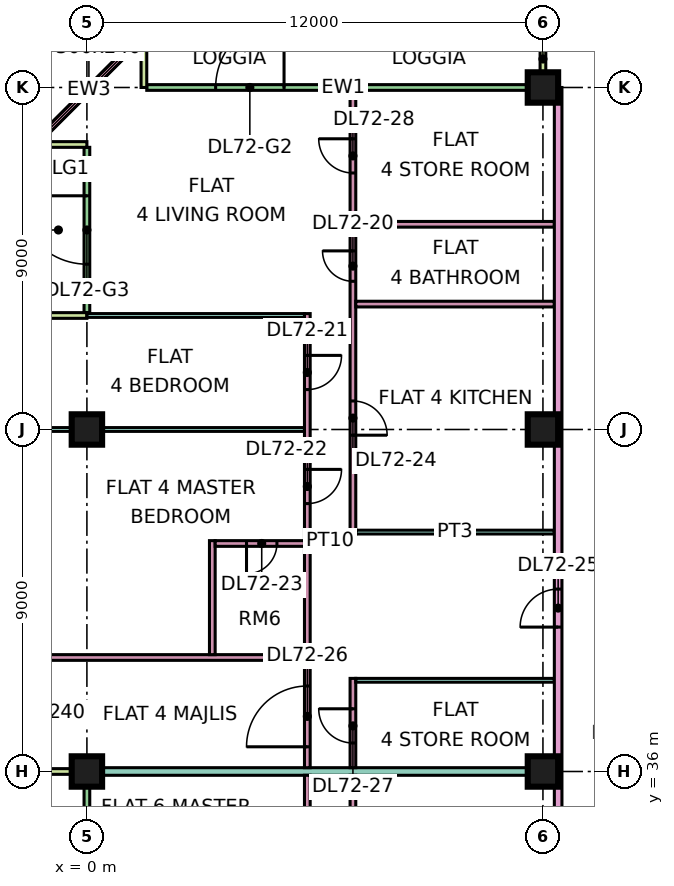
"""IFC4 building model, lengths in metres.
Left out: names, types, materials, properties, quantities, classifications, styles, units other than length and angle.
Written with IfcOpenShell. Run it as: python <this file> out.ifc"""

import sys

from ifc_helpers import new_model, si_unit, direction, frame, frame_2d, origin, origin_2d, place, context, subcontext, project, spatial, rectangle, extrude, element, fill, save


model = new_model("IFC4")
c1 = context("Model", 3, precision=1e-05, world=origin(), true_north=direction((0.0, 1.0)))
c2 = subcontext(c1, "Body", "Model", "MODEL_VIEW")
j1 = project(units=[si_unit("LENGTHUNIT", "METRE"), si_unit("PLANEANGLEUNIT", "RADIAN")], contexts=[c1])
p1 = place(None, origin())
s1 = spatial("IfcSite", under=j1, at=p1, CompositionType="ELEMENT")
p2 = place(p1, origin())
s2 = spatial("IfcBuilding", under=s1, at=p2, CompositionType="ELEMENT")
p3 = place(p2, frame((0.0, 0.0, 307.15)))
s3 = spatial("IfcBuildingStorey", under=s2, at=p3, CompositionType="ELEMENT", Elevation=307.15)
p4 = place(p3, frame((0.0, 36.0, 0.0), z_axis=(0.0, 0.0, 1.0), x_axis=(1.0, 0.0, 0.0)))
e1 = element("IfcColumn", 1, at=p4, inside=s3, PredefinedType="COLUMN", context=c2, shape_type="SweptSolid", body=[
    extrude(rectangle(XDim=0.8, YDim=0.8, at=origin_2d()), origin(), (0.0, 0.0, 1.0), 3.75),
])
for number, where, z_axis, x_axis in (
    (2, (0.0, 45.0, 0.0), (0.0, 0.0, 1.0), (1.0, 0.0, 0.0)),
    (3, (12.0, 36.0, 0.0), (0.0, 0.0, 1.0), (1.0, 0.0, 0.0)),
    (4, (12.0, 45.0, 0.0), (0.0, 0.0, 1.0), (1.0, 0.0, 0.0)),
    (5, (12.0, 54.0, 0.0), (0.0, 0.0, 1.0), (1.0, 0.0, 0.0)),
):
    element("IfcColumn", number, at=place(p3, frame(where, z_axis=z_axis, x_axis=x_axis)), inside=s3, PredefinedType="COLUMN", context=c2, shape_type="SweptSolid", body=[
        extrude(rectangle(XDim=0.8, YDim=0.8, at=origin_2d()), origin(), (0.0, 0.0, 1.0), 3.75),
    ])
p5 = place(p3, frame((11.925, 54.0, 0.0), z_axis=(0.0, 0.0, 1.0), x_axis=(-1.0, 0.0, 0.0)))
e6 = element("IfcWall", 6, at=p5, inside=s3, PredefinedType="SOLIDWALL", context=c2, shape_type="SweptSolid", body=[
    extrude(rectangle(XDim=10.35, YDim=0.15, at=frame_2d((5.175, 0.0))), origin(), (0.0, 0.0, 1.0), 3.35),
])
p6 = place(p5, frame((6.738, 0.0, 0.0)))
e7 = element("IfcOpeningElement", 7, at=p6, cuts=e6, PredefinedType="OPENING", context=c2, shape_type="SweptSolid", body=[
    extrude(rectangle(XDim=1.8, YDim=2.4, at=frame_2d((0.9, 1.2))), frame((0.0, 0.085, 0.0), z_axis=(0.0, -1.0, 0.0), x_axis=(1.0, 0.0, 0.0)), (0.0, 0.0, 1.0), 0.17),
])
for number, where, z_axis, x_axis in (
    (8, (12.0, 55.5, 0.0), (0.0, 0.0, 1.0), (0.0, -1.0, 0.0)),
    (9, (1.5, 55.5, 0.0), (0.0, 0.0, 1.0), (0.0, -1.0, 0.0)),
):
    element("IfcWall", number, at=place(p3, frame(where, z_axis=z_axis, x_axis=x_axis)), inside=s3, PredefinedType="SOLIDWALL", context=c2, shape_type="SweptSolid", body=[
        extrude(rectangle(XDim=1.5, YDim=0.15, at=frame_2d((0.75, 0.0))), origin(), (0.0, 0.0, 1.0), 3.35),
    ])
p7 = place(p3, frame((1.553, 55.447, 0.0), z_axis=(0.0, 0.0, 1.0), x_axis=(-0.707106781187, -0.707106781187, 0.0)))
e10 = element("IfcWall", 10, at=p7, inside=s3, PredefinedType="SOLIDWALL", context=c2, shape_type="SweptSolid", body=[
    extrude(rectangle(XDim=4.243, YDim=0.15, at=frame_2d((2.121, 0.0))), origin(), (0.0, 0.0, 1.0), 3.35),
])
p8 = place(p7, frame((0.621, 0.0, 0.45)))
e11 = element("IfcOpeningElement", 11, at=p8, cuts=e10, PredefinedType="OPENING", context=c2, shape_type="SweptSolid", body=[
    extrude(rectangle(XDim=3.0, YDim=2.4, at=frame_2d((1.5, 1.2))), frame((0.0, 0.085, 0.0), z_axis=(0.0, -1.0, 0.0), x_axis=(1.0, 0.0, 0.0)), (0.0, 0.0, 1.0), 0.17),
])
p9 = place(p3, frame((0.0, 52.425, 0.0), z_axis=(0.0, 0.0, 1.0), x_axis=(0.0, -1.0, 0.0)))
e12 = element("IfcWall", 12, at=p9, inside=s3, PredefinedType="SOLIDWALL", context=c2, shape_type="SweptSolid", body=[
    extrude(rectangle(XDim=4.35, YDim=0.15, at=frame_2d((2.175, 0.0))), origin(), (0.0, 0.0, 1.0), 3.35),
])
p10 = place(p9, frame((1.275, 0.0, 0.0)))
e13 = element("IfcOpeningElement", 13, at=p10, cuts=e12, PredefinedType="OPENING", context=c2, shape_type="SweptSolid", body=[
    extrude(rectangle(XDim=1.8, YDim=2.4, at=frame_2d((0.9, 1.2))), frame((0.0, 0.085, 0.0), z_axis=(0.0, -1.0, 0.0), x_axis=(1.0, 0.0, 0.0)), (0.0, 0.0, 1.0), 0.17),
])
for number, where, z_axis, x_axis in (
    (14, (-1.5, 52.5, 0.0), (0.0, 0.0, 1.0), (1.0, 0.0, 0.0)),
    (15, (-1.5, 48.0, 0.0), (0.0, 0.0, 1.0), (1.0, 0.0, 0.0)),
):
    element("IfcWall", number, at=place(p3, frame(where, z_axis=z_axis, x_axis=x_axis)), inside=s3, PredefinedType="SOLIDWALL", context=c2, shape_type="SweptSolid", body=[
        extrude(rectangle(XDim=1.5, YDim=0.15, at=frame_2d((0.75, 0.0))), origin(), (0.0, 0.0, 1.0), 3.35),
    ])
p11 = place(p3, frame((0.0, 35.925, 0.0), z_axis=(0.0, 0.0, 1.0), x_axis=(0.0, -1.0, 0.0)))
e16 = element("IfcWall", 16, at=p11, inside=s3, PredefinedType="SOLIDWALL", context=c2, shape_type="SweptSolid", body=[
    extrude(rectangle(XDim=11.85, YDim=0.15, at=frame_2d((5.925, 0.0))), origin(), (0.0, 0.0, 1.0), 3.35),
])
p12 = place(p11, frame((2.275, 0.0, 0.0)))
e17 = element("IfcOpeningElement", 17, at=p12, cuts=e16, PredefinedType="OPENING", context=c2, shape_type="SweptSolid", body=[
    extrude(rectangle(XDim=1.8, YDim=2.4, at=frame_2d((0.9, 1.2))), frame((0.0, 0.085, 0.0), z_axis=(0.0, -1.0, 0.0), x_axis=(1.0, 0.0, 0.0)), (0.0, 0.0, 1.0), 0.17),
])
p13 = place(p11, frame((6.525, 0.0, 0.45)))
e18 = element("IfcOpeningElement", 18, at=p13, cuts=e16, PredefinedType="OPENING", context=c2, shape_type="SweptSolid", body=[
    extrude(rectangle(XDim=1.8, YDim=2.4, at=frame_2d((0.9, 1.2))), frame((0.0, 0.085, 0.0), z_axis=(0.0, -1.0, 0.0), x_axis=(1.0, 0.0, 0.0)), (0.0, 0.0, 1.0), 0.17),
])
p14 = place(p11, frame((9.275, 0.0, 0.45)))
e19 = element("IfcOpeningElement", 19, at=p14, cuts=e16, PredefinedType="OPENING", context=c2, shape_type="SweptSolid", body=[
    extrude(rectangle(XDim=1.8, YDim=2.4, at=frame_2d((0.9, 1.2))), frame((0.0, 0.085, 0.0), z_axis=(0.0, -1.0, 0.0), x_axis=(1.0, 0.0, 0.0)), (0.0, 0.0, 1.0), 0.17),
])
p15 = place(p3, frame((-1.5, 36.0, 0.0), z_axis=(0.0, 0.0, 1.0), x_axis=(1.0, 0.0, 0.0)))
e20 = element("IfcWall", 20, at=p15, inside=s3, PredefinedType="SOLIDWALL", context=c2, shape_type="SweptSolid", body=[
    extrude(rectangle(XDim=1.5, YDim=0.15, at=frame_2d((0.75, 0.0))), origin(), (0.0, 0.0, 1.0), 3.35),
])
p16 = place(p3, frame((-1.351, 39.0, 0.0), z_axis=(0.0, 0.0, 1.0), x_axis=(1.0, 0.0, 0.0)))
e21 = element("IfcWall", 21, at=p16, inside=s3, PredefinedType="PARTITIONING", context=c2, shape_type="SweptSolid", body=[
    extrude(rectangle(XDim=7.076, YDim=0.15, at=frame_2d((3.538, 0.0))), origin(), (0.0, 0.0, 1.0), 3.35),
])
p17 = place(p3, frame((-1.351, 45.0, 0.0), z_axis=(0.0, 0.0, 1.0), x_axis=(1.0, 0.0, 0.0)))
e22 = element("IfcWall", 22, at=p17, inside=s3, PredefinedType="PARTITIONING", context=c2, shape_type="SweptSolid", body=[
    extrude(rectangle(XDim=7.076, YDim=0.1, at=frame_2d((3.538, 0.0))), origin(), (0.0, 0.0, 1.0), 3.35),
])
e23 = element("IfcWall", 23, at=p4, inside=s3, PredefinedType="PARTITIONING", context=c2, shape_type="SweptSolid", body=[
    extrude(rectangle(XDim=12.3, YDim=0.2, at=frame_2d((6.15, 0.0))), origin(), (0.0, 0.0, 1.0), 3.35),
])
p18 = place(p3, frame((0.0, 48.0, 0.0), z_axis=(0.0, 0.0, 1.0), x_axis=(1.0, 0.0, 0.0)))
e24 = element("IfcWall", 24, at=p18, inside=s3, PredefinedType="PARTITIONING", context=c2, shape_type="SweptSolid", body=[
    extrude(rectangle(XDim=5.725, YDim=0.1, at=frame_2d((2.863, 0.0))), origin(), (0.0, 0.0, 1.0), 3.35),
])
p19 = place(p3, frame((3.3, 39.075, 0.0), z_axis=(0.0, 0.0, 1.0), x_axis=(0.0, 1.0, 0.0)))
e25 = element("IfcWall", 25, at=p19, inside=s3, PredefinedType="PARTITIONING", context=c2, shape_type="SweptSolid", body=[
    extrude(rectangle(XDim=3.0, YDim=0.15, at=frame_2d((1.5, 0.0))), origin(), (0.0, 0.0, 1.0), 3.35),
])
p20 = place(p3, frame((3.375, 42.0, 0.0), z_axis=(0.0, 0.0, 1.0), x_axis=(1.0, 0.0, 0.0)))
e26 = element("IfcWall", 26, at=p20, inside=s3, PredefinedType="PARTITIONING", context=c2, shape_type="SweptSolid", body=[
    extrude(rectangle(XDim=2.35, YDim=0.15, at=frame_2d((1.175, 0.0))), origin(), (0.0, 0.0, 1.0), 3.35),
])
p21 = place(p20, frame((0.825, 0.0, 0.0)))
e27 = element("IfcOpeningElement", 27, at=p21, cuts=e26, PredefinedType="OPENING", context=c2, shape_type="SweptSolid", body=[
    extrude(rectangle(XDim=0.8, YDim=2.1, at=frame_2d((0.4, 1.05))), frame((0.0, 0.085, 0.0), z_axis=(0.0, -1.0, 0.0), x_axis=(1.0, 0.0, 0.0)), (0.0, 0.0, 1.0), 0.17),
])
p22 = place(p3, frame((5.8, 29.925, 0.0), z_axis=(0.0, 0.0, 1.0), x_axis=(0.0, 1.0, 0.0)))
e28 = element("IfcWall", 28, at=p22, inside=s3, PredefinedType="PARTITIONING", context=c2, shape_type="SweptSolid", body=[
    extrude(rectangle(XDim=5.975, YDim=0.15, at=frame_2d((2.987, 0.0))), origin(), (0.0, 0.0, 1.0), 3.35),
])
p23 = place(p22, frame((4.125, 0.0, 0.0)))
e29 = element("IfcOpeningElement", 29, at=p23, cuts=e28, PredefinedType="OPENING", context=c2, shape_type="SweptSolid", body=[
    extrude(rectangle(XDim=0.9, YDim=2.1, at=frame_2d((0.45, 1.05))), frame((0.0, 0.085, 0.0), z_axis=(0.0, -1.0, 0.0), x_axis=(1.0, 0.0, 0.0)), (0.0, 0.0, 1.0), 0.17),
])
p24 = place(p3, frame((5.8, 36.1, 0.0), z_axis=(0.0, 0.0, 1.0), x_axis=(0.0, 1.0, 0.0)))
e30 = element("IfcWall", 30, at=p24, inside=s3, PredefinedType="PARTITIONING", context=c2, shape_type="SweptSolid", body=[
    extrude(rectangle(XDim=11.95, YDim=0.15, at=frame_2d((5.975, 0.0))), origin(), (0.0, 0.0, 1.0), 3.35),
])
p25 = place(p24, frame((9.95, 0.0, 0.0)))
e31 = element("IfcOpeningElement", 31, at=p25, cuts=e30, PredefinedType="OPENING", context=c2, shape_type="SweptSolid", body=[
    extrude(rectangle(XDim=0.9, YDim=2.1, at=frame_2d((0.45, 1.05))), frame((0.0, 0.085, 0.0), z_axis=(0.0, -1.0, 0.0), x_axis=(1.0, 0.0, 0.0)), (0.0, 0.0, 1.0), 0.17),
])
p26 = place(p24, frame((6.95, 0.0, 0.0)))
e32 = element("IfcOpeningElement", 32, at=p26, cuts=e30, PredefinedType="OPENING", context=c2, shape_type="SweptSolid", body=[
    extrude(rectangle(XDim=0.9, YDim=2.1, at=frame_2d((0.45, 1.05))), frame((0.0, 0.085, 0.0), z_axis=(0.0, -1.0, 0.0), x_axis=(1.0, 0.0, 0.0)), (0.0, 0.0, 1.0), 0.17),
])
p27 = place(p24, frame((0.55, 0.0, 0.0)))
e33 = element("IfcOpeningElement", 33, at=p27, cuts=e30, PredefinedType="OPENING", context=c2, shape_type="SweptSolid", body=[
    extrude(rectangle(XDim=1.6, YDim=2.1, at=frame_2d((0.8, 1.05))), frame((0.0, 0.085, 0.0), z_axis=(0.0, -1.0, 0.0), x_axis=(1.0, 0.0, 0.0)), (0.0, 0.0, 1.0), 0.17),
])
p28 = place(p3, frame((7.0, 26.325, 0.0), z_axis=(0.0, 0.0, 1.0), x_axis=(0.0, 1.0, 0.0)))
e34 = element("IfcWall", 34, at=p28, inside=s3, PredefinedType="PARTITIONING", context=c2, shape_type="SweptSolid", body=[
    extrude(rectangle(XDim=9.575, YDim=0.15, at=frame_2d((4.788, 0.0))), origin(), (0.0, 0.0, 1.0), 3.35),
])
p29 = place(p28, frame((6.525, 0.0, 0.0)))
e35 = element("IfcOpeningElement", 35, at=p29, cuts=e34, PredefinedType="OPENING", context=c2, shape_type="SweptSolid", body=[
    extrude(rectangle(XDim=0.9, YDim=2.1, at=frame_2d((0.45, 1.05))), frame((0.0, 0.085, 0.0), z_axis=(0.0, -1.0, 0.0), x_axis=(1.0, 0.0, 0.0)), (0.0, 0.0, 1.0), 0.17),
])
p30 = place(p3, frame((7.0, 36.1, 0.0), z_axis=(0.0, 0.0, 1.0), x_axis=(0.0, 1.0, 0.0)))
e36 = element("IfcWall", 36, at=p30, inside=s3, PredefinedType="PARTITIONING", context=c2, shape_type="SweptSolid", body=[
    extrude(rectangle(XDim=2.35, YDim=0.15, at=frame_2d((1.175, 0.0))), origin(), (0.0, 0.0, 1.0), 3.35),
])
p31 = place(p30, frame((0.65, 0.0, 0.0)))
e37 = element("IfcOpeningElement", 37, at=p31, cuts=e36, PredefinedType="OPENING", context=c2, shape_type="SweptSolid", body=[
    extrude(rectangle(XDim=0.9, YDim=2.1, at=frame_2d((0.45, 1.05))), frame((0.0, 0.085, 0.0), z_axis=(0.0, -1.0, 0.0), x_axis=(1.0, 0.0, 0.0)), (0.0, 0.0, 1.0), 0.17),
])
p32 = place(p3, frame((7.0, 42.25, 0.0), z_axis=(0.0, 0.0, 1.0), x_axis=(0.0, 1.0, 0.0)))
e38 = element("IfcWall", 38, at=p32, inside=s3, PredefinedType="PARTITIONING", context=c2, shape_type="SweptSolid", body=[
    extrude(rectangle(XDim=11.676, YDim=0.15, at=frame_2d((5.838, 0.0))), origin(), (0.0, 0.0, 1.0), 3.35),
])
p33 = place(p32, frame((6.65, 0.0, 0.0)))
e39 = element("IfcOpeningElement", 39, at=p33, cuts=e38, PredefinedType="OPENING", context=c2, shape_type="SweptSolid", body=[
    extrude(rectangle(XDim=0.8, YDim=2.1, at=frame_2d((0.4, 1.05))), frame((0.0, 0.085, 0.0), z_axis=(0.0, -1.0, 0.0), x_axis=(1.0, 0.0, 0.0)), (0.0, 0.0, 1.0), 0.17),
])
p34 = place(p32, frame((2.6, 0.0, 0.0)))
e40 = element("IfcOpeningElement", 40, at=p34, cuts=e38, PredefinedType="OPENING", context=c2, shape_type="SweptSolid", body=[
    extrude(rectangle(XDim=0.9, YDim=2.1, at=frame_2d((0.45, 1.05))), frame((0.0, 0.085, 0.0), z_axis=(0.0, -1.0, 0.0), x_axis=(1.0, 0.0, 0.0)), (0.0, 0.0, 1.0), 0.17),
])
p35 = place(p32, frame((9.5, 0.0, 0.0)))
e41 = element("IfcOpeningElement", 41, at=p35, cuts=e38, PredefinedType="OPENING", context=c2, shape_type="SweptSolid", body=[
    extrude(rectangle(XDim=0.9, YDim=2.1, at=frame_2d((0.45, 1.05))), frame((0.0, 0.085, 0.0), z_axis=(0.0, -1.0, 0.0), x_axis=(1.0, 0.0, 0.0)), (0.0, 0.0, 1.0), 0.17),
])
for number, where, z_axis, x_axis in (
    (42, (7.075, 38.4, 0.0), (0.0, 0.0, 1.0), (1.0, 0.0, 0.0)),
    (43, (7.075, 42.3, 0.0), (0.0, 0.0, 1.0), (1.0, 0.0, 0.0)),
):
    element("IfcWall", number, at=place(p3, frame(where, z_axis=z_axis, x_axis=x_axis)), inside=s3, PredefinedType="PARTITIONING", context=c2, shape_type="SweptSolid", body=[
        extrude(rectangle(XDim=5.225, YDim=0.1, at=frame_2d((2.613, 0.0))), origin(), (0.0, 0.0, 1.0), 3.35),
    ])
for number, where, z_axis, x_axis in (
    (44, (7.075, 48.3, 0.0), (0.0, 0.0, 1.0), (1.0, 0.0, 0.0)),
    (45, (7.075, 50.4, 0.0), (0.0, 0.0, 1.0), (1.0, 0.0, 0.0)),
):
    element("IfcWall", number, at=place(p3, frame(where, z_axis=z_axis, x_axis=x_axis)), inside=s3, PredefinedType="PARTITIONING", context=c2, shape_type="SweptSolid", body=[
        extrude(rectangle(XDim=5.225, YDim=0.15, at=frame_2d((2.613, 0.0))), origin(), (0.0, 0.0, 1.0), 3.35),
    ])
p36 = place(p3, frame((12.4, 20.0, 0.0), z_axis=(0.0, 0.0, 1.0), x_axis=(0.0, 1.0, 0.0)))
e46 = element("IfcWall", 46, at=p36, inside=s3, PredefinedType="PARTITIONING", context=c2, shape_type="SweptSolid", body=[
    extrude(rectangle(XDim=34.0, YDim=0.2, at=frame_2d((17.0, 0.0))), origin(), (0.0, 0.0, 1.0), 3.35),
])
p37 = place(p36, frame((19.8, 0.0, 0.0)))
e47 = element("IfcOpeningElement", 47, at=p37, cuts=e46, PredefinedType="OPENING", context=c2, shape_type="SweptSolid", body=[
    extrude(rectangle(XDim=1.0, YDim=2.1, at=frame_2d((0.5, 1.05))), frame((0.0, 0.11, 0.0), z_axis=(0.0, -1.0, 0.0), x_axis=(1.0, 0.0, 0.0)), (0.0, 0.0, 1.0), 0.22),
])
p38 = place(p36, frame((0.6, 0.0, 0.0)))
e48 = element("IfcOpeningElement", 48, at=p38, cuts=e46, PredefinedType="OPENING", context=c2, shape_type="SweptSolid", body=[
    extrude(rectangle(XDim=1.2, YDim=2.1, at=frame_2d((0.6, 1.05))), frame((0.0, 0.11, 0.0), z_axis=(0.0, -1.0, 0.0), x_axis=(1.0, 0.0, 0.0)), (0.0, 0.0, 1.0), 0.22),
])
p39 = place(p36, frame((4.5, 0.0, 0.0)))
e49 = element("IfcOpeningElement", 49, at=p39, cuts=e46, PredefinedType="OPENING", context=c2, shape_type="SweptSolid", body=[
    extrude(rectangle(XDim=1.0, YDim=2.1, at=frame_2d((0.5, 1.05))), frame((0.0, 0.11, 0.0), z_axis=(0.0, -1.0, 0.0), x_axis=(1.0, 0.0, 0.0)), (0.0, 0.0, 1.0), 0.22),
])
p40 = place(p6, frame((1.8, 0.0, 0.0), z_axis=(0.0, 0.0, 1.0), x_axis=(-1.0, 0.0, 0.0)))
e50 = element("IfcDoor", 50, at=p40, inside=s3, OperationType="DOUBLE_DOOR_SINGLE_SWING", PredefinedType="DOOR", context=c2, shape_type="SweptSolid", body=[
    extrude(rectangle(XDim=1.8, YDim=2.4, at=frame_2d((0.9, 1.2))), frame((0.0, 0.025, 0.0), z_axis=(0.0, -1.0, 0.0), x_axis=(1.0, 0.0, 0.0)), (0.0, 0.0, 1.0), 0.05),
])
fill(e7, e50)
p41 = place(p8, origin())
e51 = element("IfcWindow", 51, at=p41, inside=s3, PartitioningType="SINGLE_PANEL", PredefinedType="WINDOW", context=c2, shape_type="SweptSolid", body=[
    extrude(rectangle(XDim=3.0, YDim=2.4, at=frame_2d((1.5, 1.2))), frame((0.0, 0.03, 0.0), z_axis=(0.0, -1.0, 0.0), x_axis=(1.0, 0.0, 0.0)), (0.0, 0.0, 1.0), 0.06),
])
fill(e11, e51)
p42 = place(p10, frame((1.8, 0.0, 0.0), z_axis=(0.0, 0.0, 1.0), x_axis=(-1.0, 0.0, 0.0)))
e52 = element("IfcDoor", 52, at=p42, inside=s3, OperationType="DOUBLE_DOOR_SINGLE_SWING", PredefinedType="DOOR", context=c2, shape_type="SweptSolid", body=[
    extrude(rectangle(XDim=1.8, YDim=2.4, at=frame_2d((0.9, 1.2))), frame((0.0, 0.025, 0.0), z_axis=(0.0, -1.0, 0.0), x_axis=(1.0, 0.0, 0.0)), (0.0, 0.0, 1.0), 0.05),
])
fill(e13, e52)
p43 = place(p33, frame((0.8, 0.0, 0.0), z_axis=(0.0, 0.0, 1.0), x_axis=(-1.0, 0.0, 0.0)))
e53 = element("IfcDoor", 53, at=p43, inside=s3, OperationType="SINGLE_SWING_RIGHT", PredefinedType="DOOR", context=c2, shape_type="SweptSolid", body=[
    extrude(rectangle(XDim=0.8, YDim=2.1, at=frame_2d((0.4, 1.05))), frame((0.0, 0.025, 0.0), z_axis=(0.0, -1.0, 0.0), x_axis=(1.0, 0.0, 0.0)), (0.0, 0.0, 1.0), 0.05),
])
fill(e39, e53)
p44 = place(p25, origin())
e54 = element("IfcDoor", 54, at=p44, inside=s3, OperationType="SINGLE_SWING_RIGHT", PredefinedType="DOOR", context=c2, shape_type="SweptSolid", body=[
    extrude(rectangle(XDim=0.9, YDim=2.1, at=frame_2d((0.45, 1.05))), frame((0.0, 0.025, 0.0), z_axis=(0.0, -1.0, 0.0), x_axis=(1.0, 0.0, 0.0)), (0.0, 0.0, 1.0), 0.05),
])
fill(e31, e54)
p45 = place(p26, origin())
e55 = element("IfcDoor", 55, at=p45, inside=s3, OperationType="SINGLE_SWING_RIGHT", PredefinedType="DOOR", context=c2, shape_type="SweptSolid", body=[
    extrude(rectangle(XDim=0.9, YDim=2.1, at=frame_2d((0.45, 1.05))), frame((0.0, 0.025, 0.0), z_axis=(0.0, -1.0, 0.0), x_axis=(1.0, 0.0, 0.0)), (0.0, 0.0, 1.0), 0.05),
])
fill(e32, e55)
p46 = place(p21, frame((0.8, 0.0, 0.0), z_axis=(0.0, 0.0, 1.0), x_axis=(-1.0, 0.0, 0.0)))
e56 = element("IfcDoor", 56, at=p46, inside=s3, OperationType="SINGLE_SWING_LEFT", PredefinedType="DOOR", context=c2, shape_type="SweptSolid", body=[
    extrude(rectangle(XDim=0.8, YDim=2.1, at=frame_2d((0.4, 1.05))), frame((0.0, 0.025, 0.0), z_axis=(0.0, -1.0, 0.0), x_axis=(1.0, 0.0, 0.0)), (0.0, 0.0, 1.0), 0.05),
])
fill(e27, e56)
p47 = place(p34, frame((0.9, 0.0, 0.0), z_axis=(0.0, 0.0, 1.0), x_axis=(-1.0, 0.0, 0.0)))
e57 = element("IfcDoor", 57, at=p47, inside=s3, OperationType="SINGLE_SWING_LEFT", PredefinedType="DOOR", context=c2, shape_type="SweptSolid", body=[
    extrude(rectangle(XDim=0.9, YDim=2.1, at=frame_2d((0.45, 1.05))), frame((0.0, 0.025, 0.0), z_axis=(0.0, -1.0, 0.0), x_axis=(1.0, 0.0, 0.0)), (0.0, 0.0, 1.0), 0.05),
])
fill(e40, e57)
p48 = place(p37, origin())
e58 = element("IfcDoor", 58, at=p48, inside=s3, OperationType="SINGLE_SWING_LEFT", PredefinedType="DOOR", context=c2, shape_type="SweptSolid", body=[
    extrude(rectangle(XDim=1.0, YDim=2.1, at=frame_2d((0.5, 1.05))), frame((0.0, 0.025, 0.0), z_axis=(0.0, -1.0, 0.0), x_axis=(1.0, 0.0, 0.0)), (0.0, 0.0, 1.0), 0.05),
])
fill(e47, e58)
p49 = place(p27, origin())
e59 = element("IfcDoor", 59, at=p49, inside=s3, OperationType="DOUBLE_DOOR_SINGLE_SWING", PredefinedType="DOOR", context=c2, shape_type="SweptSolid", body=[
    extrude(rectangle(XDim=1.6, YDim=2.1, at=frame_2d((0.8, 1.05))), frame((0.0, 0.025, 0.0), z_axis=(0.0, -1.0, 0.0), x_axis=(1.0, 0.0, 0.0)), (0.0, 0.0, 1.0), 0.05),
])
fill(e33, e59)
p50 = place(p31, frame((0.9, 0.0, 0.0), z_axis=(0.0, 0.0, 1.0), x_axis=(-1.0, 0.0, 0.0)))
e60 = element("IfcDoor", 60, at=p50, inside=s3, OperationType="SINGLE_SWING_RIGHT", PredefinedType="DOOR", context=c2, shape_type="SweptSolid", body=[
    extrude(rectangle(XDim=0.9, YDim=2.1, at=frame_2d((0.45, 1.05))), frame((0.0, 0.025, 0.0), z_axis=(0.0, -1.0, 0.0), x_axis=(1.0, 0.0, 0.0)), (0.0, 0.0, 1.0), 0.05),
])
fill(e37, e60)
p51 = place(p35, frame((0.9, 0.0, 0.0), z_axis=(0.0, 0.0, 1.0), x_axis=(-1.0, 0.0, 0.0)))
e61 = element("IfcDoor", 61, at=p51, inside=s3, OperationType="SINGLE_SWING_RIGHT", PredefinedType="DOOR", context=c2, shape_type="SweptSolid", body=[
    extrude(rectangle(XDim=0.9, YDim=2.1, at=frame_2d((0.45, 1.05))), frame((0.0, 0.025, 0.0), z_axis=(0.0, -1.0, 0.0), x_axis=(1.0, 0.0, 0.0)), (0.0, 0.0, 1.0), 0.05),
])
fill(e41, e61)
save(model, sys.argv[1])
